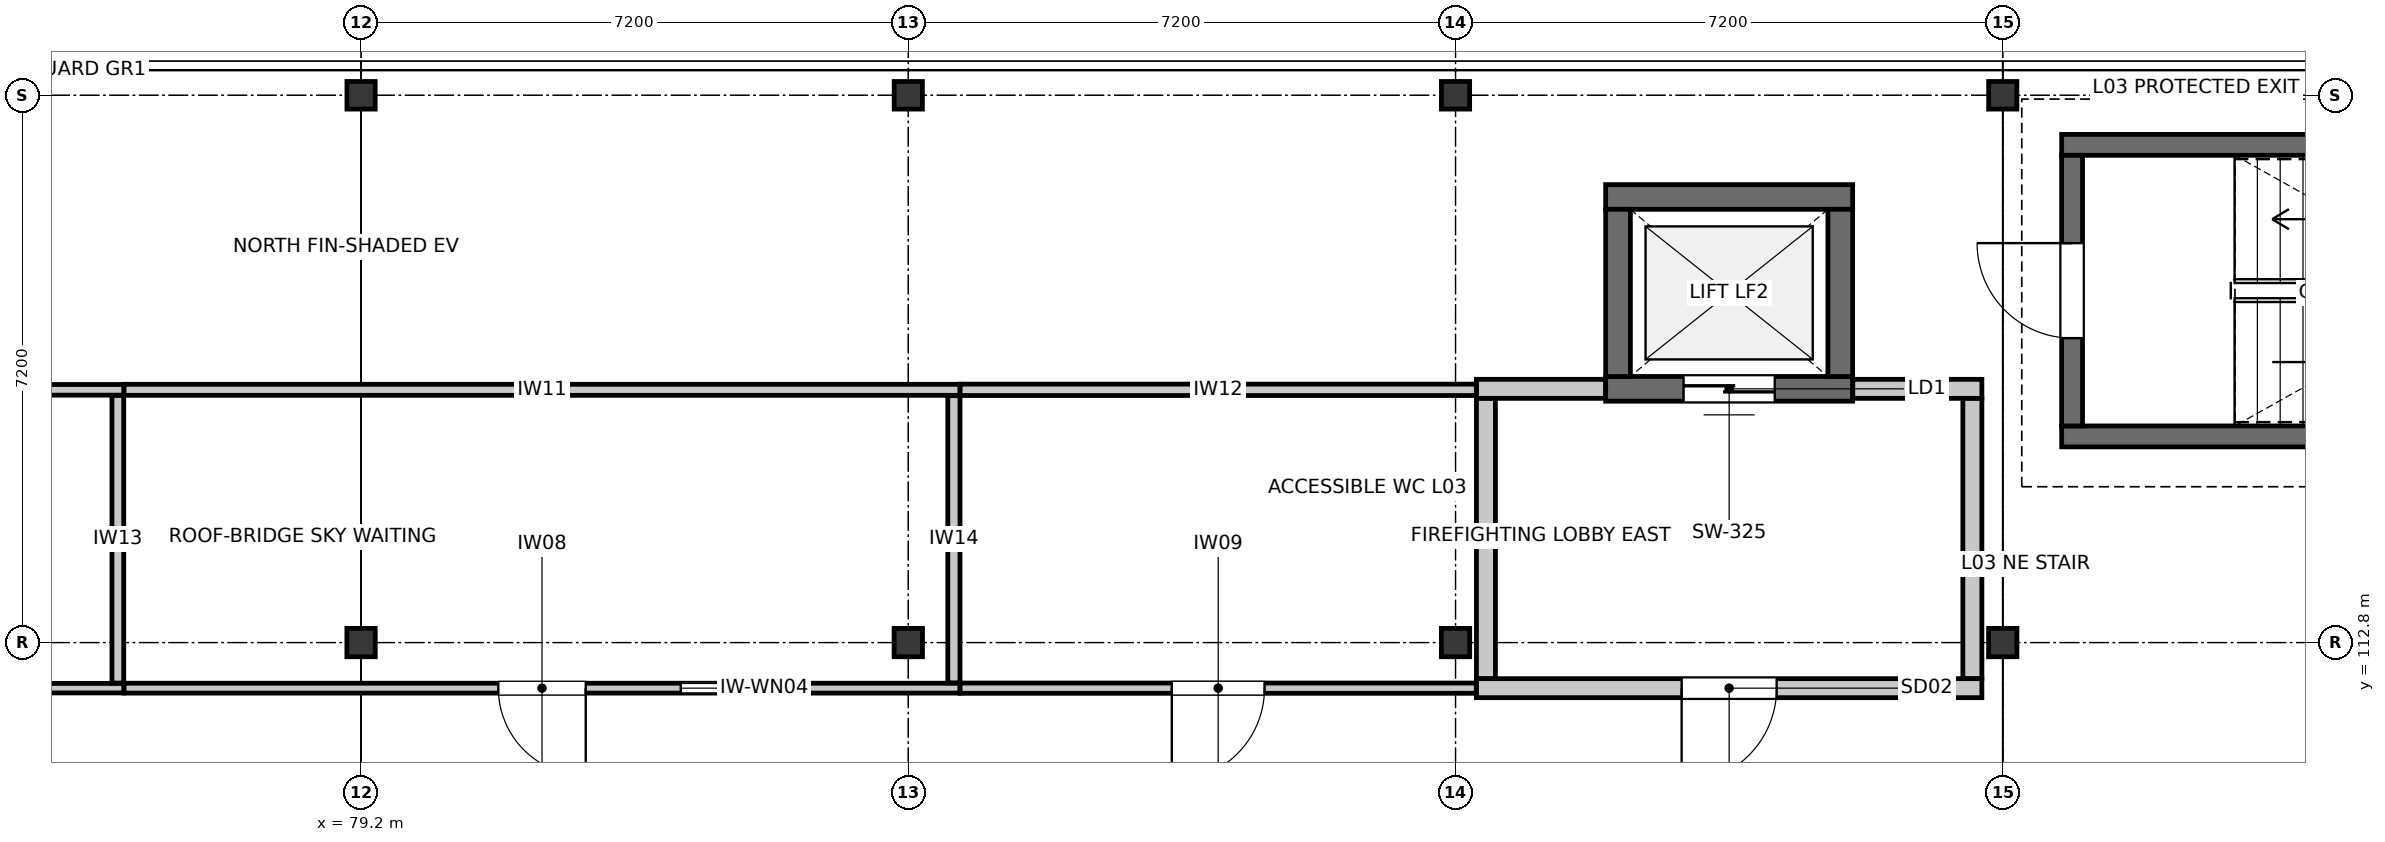
"""IFC4 building model, lengths in metres.
Left out: names, types, materials, properties, quantities, classifications, styles, units other than length and angle.
Written with IfcOpenShell. Run it as: python <this file> out.ifc"""

import sys

from ifc_helpers import new_model, si_unit, direction, frame, frame_2d, origin, origin_2d, place, context, subcontext, project, spatial, rectangle, i_section, extrude, element, fill, save


model = new_model("IFC4")
c1 = context("Model", 3, precision=1e-05, world=origin(), true_north=direction((0.0, 1.0)))
c2 = subcontext(c1, "Body", "Model", "MODEL_VIEW")
j1 = project(units=[si_unit("LENGTHUNIT", "METRE"), si_unit("PLANEANGLEUNIT", "RADIAN")], contexts=[c1])
p1 = place(None, origin())
s1 = spatial("IfcSite", under=j1, at=p1, CompositionType="ELEMENT")
p2 = place(p1, origin())
s2 = spatial("IfcBuilding", under=s1, at=p2, CompositionType="ELEMENT")
p3 = place(p2, frame((0.0, 0.0, 13.2)))
s3 = spatial("IfcBuildingStorey", under=s2, at=p3, CompositionType="ELEMENT", Elevation=13.2)
p4 = place(p3, frame((79.2, 112.8, 0.0), z_axis=(0.0, 0.0, 1.0), x_axis=(1.0, 0.0, 0.0)))
e1 = element("IfcColumn", 1, at=p4, inside=s3, PredefinedType="COLUMN", context=c2, shape_type="SweptSolid", body=[
    extrude(i_section(OverallWidth=0.373, OverallDepth=0.373, WebThickness=0.016, FlangeThickness=0.026, FilletRadius=0.015, at=origin_2d()), origin(), (0.0, 0.0, 1.0), 3.9),
])
p5 = place(p3, frame((79.2, 120.0, 0.0), z_axis=(0.0, 0.0, 1.0), x_axis=(1.0, 0.0, 0.0)))
e2 = element("IfcColumn", 2, at=p5, inside=s3, PredefinedType="COLUMN", context=c2, shape_type="SweptSolid", body=[
    extrude(i_section(OverallWidth=0.371, OverallDepth=0.363, WebThickness=0.013, FlangeThickness=0.022, FilletRadius=0.015, at=origin_2d()), origin(), (0.0, 0.0, 1.0), 3.9),
])
p6 = place(p3, frame((86.4, 112.8, 0.0), z_axis=(0.0, 0.0, 1.0), x_axis=(1.0, 0.0, 0.0)))
e3 = element("IfcColumn", 3, at=p6, inside=s3, PredefinedType="COLUMN", context=c2, shape_type="SweptSolid", body=[
    extrude(i_section(OverallWidth=0.373, OverallDepth=0.373, WebThickness=0.016, FlangeThickness=0.026, FilletRadius=0.015, at=origin_2d()), origin(), (0.0, 0.0, 1.0), 3.9),
])
p7 = place(p3, frame((86.4, 120.0, 0.0), z_axis=(0.0, 0.0, 1.0), x_axis=(1.0, 0.0, 0.0)))
e4 = element("IfcColumn", 4, at=p7, inside=s3, PredefinedType="COLUMN", context=c2, shape_type="SweptSolid", body=[
    extrude(i_section(OverallWidth=0.371, OverallDepth=0.363, WebThickness=0.013, FlangeThickness=0.022, FilletRadius=0.015, at=origin_2d()), origin(), (0.0, 0.0, 1.0), 3.9),
])
p8 = place(p3, frame((93.6, 112.8, 0.0), z_axis=(0.0, 0.0, 1.0), x_axis=(1.0, 0.0, 0.0)))
e5 = element("IfcColumn", 5, at=p8, inside=s3, PredefinedType="COLUMN", context=c2, shape_type="SweptSolid", body=[
    extrude(i_section(OverallWidth=0.373, OverallDepth=0.373, WebThickness=0.016, FlangeThickness=0.026, FilletRadius=0.015, at=origin_2d()), origin(), (0.0, 0.0, 1.0), 3.9),
])
p9 = place(p3, frame((93.6, 120.0, 0.0), z_axis=(0.0, 0.0, 1.0), x_axis=(1.0, 0.0, 0.0)))
e6 = element("IfcColumn", 6, at=p9, inside=s3, PredefinedType="COLUMN", context=c2, shape_type="SweptSolid", body=[
    extrude(i_section(OverallWidth=0.371, OverallDepth=0.363, WebThickness=0.013, FlangeThickness=0.022, FilletRadius=0.015, at=origin_2d()), origin(), (0.0, 0.0, 1.0), 3.9),
])
p10 = place(p3, frame((100.8, 112.8, 0.0), z_axis=(0.0, 0.0, 1.0), x_axis=(1.0, 0.0, 0.0)))
e7 = element("IfcColumn", 7, at=p10, inside=s3, PredefinedType="COLUMN", context=c2, shape_type="SweptSolid", body=[
    extrude(i_section(OverallWidth=0.373, OverallDepth=0.373, WebThickness=0.016, FlangeThickness=0.026, FilletRadius=0.015, at=origin_2d()), origin(), (0.0, 0.0, 1.0), 3.9),
])
p11 = place(p3, frame((100.8, 120.0, 0.0), z_axis=(0.0, 0.0, 1.0), x_axis=(1.0, 0.0, 0.0)))
e8 = element("IfcColumn", 8, at=p11, inside=s3, PredefinedType="COLUMN", context=c2, shape_type="SweptSolid", body=[
    extrude(i_section(OverallWidth=0.371, OverallDepth=0.363, WebThickness=0.013, FlangeThickness=0.022, FilletRadius=0.015, at=origin_2d()), origin(), (0.0, 0.0, 1.0), 3.9),
])
for number, where, z_axis, x_axis in (
    (9, (110.475, 115.512, 0.0), (0.0, 0.0, 1.0), (-1.0, 0.0, 0.0)),
    (10, (101.575, 119.348, 0.0), (0.0, 0.0, 1.0), (1.0, 0.0, 0.0)),
):
    element("IfcWall", number, at=place(p3, frame(where, z_axis=z_axis, x_axis=x_axis)), inside=s3, PredefinedType="SOLIDWALL", context=c2, shape_type="SweptSolid", body=[
        extrude(rectangle(XDim=8.9, YDim=0.275, at=frame_2d((4.45, 0.0))), origin(), (0.0, 0.0, 1.0), 3.66),
    ])
p12 = place(p3, frame((101.712, 115.65, 0.0), z_axis=(0.0, 0.0, 1.0), x_axis=(0.0, 1.0, 0.0)))
e11 = element("IfcWall", 11, at=p12, inside=s3, PredefinedType="SOLIDWALL", context=c2, shape_type="SweptSolid", body=[
    extrude(rectangle(XDim=3.56, YDim=0.275, at=frame_2d((1.78, 0.0))), origin(), (0.0, 0.0, 1.0), 3.66),
])
p13 = place(p12, frame((1.155, 0.0, 0.0)))
e12 = element("IfcOpeningElement", 12, at=p13, cuts=e11, PredefinedType="OPENING", context=c2, shape_type="SweptSolid", body=[
    extrude(rectangle(XDim=1.25, YDim=2.2, at=frame_2d((0.625, 1.1))), frame((0.0, 0.147, 0.0), z_axis=(0.0, -1.0, 0.0), x_axis=(1.0, 0.0, 0.0)), (0.0, 0.0, 1.0), 0.295),
])
p14 = place(p3, frame((98.825, 116.138, 0.0), z_axis=(0.0, 0.0, 1.0), x_axis=(-1.0, 0.0, 0.0)))
e13 = element("IfcWall", 13, at=p14, inside=s3, PredefinedType="SHEAR", context=c2, shape_type="SweptSolid", body=[
    extrude(rectangle(XDim=3.25, YDim=0.325, at=frame_2d((1.625, 0.0))), origin(), (0.0, 0.0, 1.0), 3.66),
])
p15 = place(p14, frame((1.025, 0.0, 0.0)))
e14 = element("IfcOpeningElement", 14, at=p15, cuts=e13, PredefinedType="OPENING", context=c2, shape_type="SweptSolid", body=[
    extrude(rectangle(XDim=1.2, YDim=2.2, at=frame_2d((0.6, 1.1))), frame((0.0, 0.172, 0.0), z_axis=(0.0, -1.0, 0.0), x_axis=(1.0, 0.0, 0.0)), (0.0, 0.0, 1.0), 0.345),
])
p16 = place(p3, frame((95.575, 118.662, 0.0), z_axis=(0.0, 0.0, 1.0), x_axis=(1.0, 0.0, 0.0)))
e15 = element("IfcWall", 15, at=p16, inside=s3, PredefinedType="SHEAR", context=c2, shape_type="SweptSolid", body=[
    extrude(rectangle(XDim=3.25, YDim=0.325, at=frame_2d((1.625, 0.0))), origin(), (0.0, 0.0, 1.0), 3.66),
])
for number, where, z_axis, x_axis in (
    (16, (95.738, 116.3, 0.0), (0.0, 0.0, 1.0), (0.0, 1.0, 0.0)),
    (17, (98.662, 118.5, 0.0), (0.0, 0.0, 1.0), (0.0, -1.0, 0.0)),
):
    element("IfcWall", number, at=place(p3, frame(where, z_axis=z_axis, x_axis=x_axis)), inside=s3, PredefinedType="SHEAR", context=c2, shape_type="SweptSolid", body=[
        extrude(rectangle(XDim=2.2, YDim=0.325, at=frame_2d((1.1, 0.0))), origin(), (0.0, 0.0, 1.0), 3.66),
    ])
p17 = place(p3, frame((100.525, 112.2, 0.0), z_axis=(0.0, 0.0, 1.0), x_axis=(-1.0, 0.0, 0.0)))
e18 = element("IfcWall", 18, at=p17, inside=s3, PredefinedType="PARTITIONING", context=c2, shape_type="SweptSolid", body=[
    extrude(rectangle(XDim=6.65, YDim=0.25, at=frame_2d((3.325, 0.0))), origin(), (0.0, 0.0, 1.0), 3.028),
])
p18 = place(p17, frame((2.7, 0.0, 0.0)))
e19 = element("IfcOpeningElement", 19, at=p18, cuts=e18, PredefinedType="OPENING", context=c2, shape_type="SweptSolid", body=[
    extrude(rectangle(XDim=1.25, YDim=2.2, at=frame_2d((0.625, 1.1))), frame((0.0, 0.135, 0.0), z_axis=(0.0, -1.0, 0.0), x_axis=(1.0, 0.0, 0.0)), (0.0, 0.0, 1.0), 0.27),
])
for number, where, z_axis, x_axis in (
    (20, (93.875, 116.138, 0.0), (0.0, 0.0, 1.0), (1.0, 0.0, 0.0)),
    (21, (98.827, 116.138, 0.0), (0.0, 0.0, 1.0), (1.0, 0.0, 0.0)),
):
    element("IfcWall", number, at=place(p3, frame(where, z_axis=z_axis, x_axis=x_axis)), inside=s3, PredefinedType="PARTITIONING", context=c2, shape_type="SweptSolid", body=[
        extrude(rectangle(XDim=1.698, YDim=0.25, at=frame_2d((0.849, 0.0))), origin(), (0.0, 0.0, 1.0), 3.028),
    ])
for number, where, z_axis, x_axis in (
    (22, (94.0, 112.327, 0.0), (0.0, 0.0, 1.0), (0.0, 1.0, 0.0)),
    (23, (100.4, 116.011, 0.0), (0.0, 0.0, 1.0), (0.0, -1.0, 0.0)),
):
    element("IfcWall", number, at=place(p3, frame(where, z_axis=z_axis, x_axis=x_axis)), inside=s3, PredefinedType="PARTITIONING", context=c2, shape_type="SweptSolid", body=[
        extrude(rectangle(XDim=3.684, YDim=0.25, at=frame_2d((1.842, 0.0))), origin(), (0.0, 0.0, 1.0), 3.028),
    ])
p19 = place(p3, frame((76.08, 112.2, 0.0), z_axis=(0.0, 0.0, 1.0), x_axis=(-1.0, 0.0, 0.0)))
e24 = element("IfcWall", 24, at=p19, inside=s3, PredefinedType="PARTITIONING", context=c2, shape_type="SweptSolid", body=[
    extrude(rectangle(XDim=11.553, YDim=0.125, at=frame_2d((5.776, 0.0))), origin(), (0.0, 0.0, 1.0), 3.028),
])
p20 = place(p19, frame((5.226, 0.0, 0.0)))
e25 = element("IfcOpeningElement", 25, at=p20, cuts=e24, PredefinedType="OPENING", context=c2, shape_type="SweptSolid", body=[
    extrude(rectangle(XDim=1.1, YDim=2.1, at=frame_2d((0.55, 1.05))), frame((0.0, 0.073, 0.0), z_axis=(0.0, -1.0, 0.0), x_axis=(1.0, 0.0, 0.0)), (0.0, 0.0, 1.0), 0.145),
])
p21 = place(p3, frame((87.08, 112.2, 0.0), z_axis=(0.0, 0.0, 1.0), x_axis=(-1.0, 0.0, 0.0)))
e26 = element("IfcWall", 26, at=p21, inside=s3, PredefinedType="PARTITIONING", context=c2, shape_type="SweptSolid", body=[
    extrude(rectangle(XDim=10.998, YDim=0.13, at=frame_2d((5.499, 0.0))), origin(), (0.0, 0.0, 1.0), 3.028),
])
p22 = place(p21, frame((4.924, 0.0, 0.0)))
e27 = element("IfcOpeningElement", 27, at=p22, cuts=e26, PredefinedType="OPENING", context=c2, shape_type="SweptSolid", body=[
    extrude(rectangle(XDim=1.15, YDim=2.1, at=frame_2d((0.575, 1.05))), frame((0.0, 0.075, 0.0), z_axis=(0.0, -1.0, 0.0), x_axis=(1.0, 0.0, 0.0)), (0.0, 0.0, 1.0), 0.15),
])
p23 = place(p21, frame((2.074, 0.0, 0.95)))
e28 = element("IfcOpeningElement", 28, at=p23, cuts=e26, PredefinedType="OPENING", context=c2, shape_type="SweptSolid", body=[
    extrude(rectangle(XDim=1.6, YDim=1.0, at=frame_2d((0.8, 0.5))), frame((0.0, 0.075, 0.0), z_axis=(0.0, -1.0, 0.0), x_axis=(1.0, 0.0, 0.0)), (0.0, 0.0, 1.0), 0.15),
])
p24 = place(p3, frame((93.873, 112.2, 0.0), z_axis=(0.0, 0.0, 1.0), x_axis=(-1.0, 0.0, 0.0)))
e29 = element("IfcWall", 29, at=p24, inside=s3, PredefinedType="PARTITIONING", context=c2, shape_type="SweptSolid", body=[
    extrude(rectangle(XDim=6.791, YDim=0.135, at=frame_2d((3.396, 0.0))), origin(), (0.0, 0.0, 1.0), 3.028),
])
p25 = place(p24, frame((2.786, 0.0, 0.0)))
e30 = element("IfcOpeningElement", 30, at=p25, cuts=e29, PredefinedType="OPENING", context=c2, shape_type="SweptSolid", body=[
    extrude(rectangle(XDim=1.22, YDim=2.1, at=frame_2d((0.61, 1.05))), frame((0.0, 0.077, 0.0), z_axis=(0.0, -1.0, 0.0), x_axis=(1.0, 0.0, 0.0)), (0.0, 0.0, 1.0), 0.155),
])
p26 = place(p3, frame((64.527, 116.125, 0.0), z_axis=(0.0, 0.0, 1.0), x_axis=(1.0, 0.0, 0.0)))
e31 = element("IfcWall", 31, at=p26, inside=s3, PredefinedType="PARTITIONING", context=c2, shape_type="SweptSolid", body=[
    extrude(rectangle(XDim=11.553, YDim=0.14, at=frame_2d((5.776, 0.0))), origin(), (0.0, 0.0, 1.0), 3.028),
])
p27 = place(p3, frame((76.082, 116.125, 0.0), z_axis=(0.0, 0.0, 1.0), x_axis=(1.0, 0.0, 0.0)))
e32 = element("IfcWall", 32, at=p27, inside=s3, PredefinedType="PARTITIONING", context=c2, shape_type="SweptSolid", body=[
    extrude(rectangle(XDim=10.998, YDim=0.145, at=frame_2d((5.499, 0.0))), origin(), (0.0, 0.0, 1.0), 3.028),
])
p28 = place(p3, frame((87.082, 116.125, 0.0), z_axis=(0.0, 0.0, 1.0), x_axis=(1.0, 0.0, 0.0)))
e33 = element("IfcWall", 33, at=p28, inside=s3, PredefinedType="PARTITIONING", context=c2, shape_type="SweptSolid", body=[
    extrude(rectangle(XDim=6.791, YDim=0.15, at=frame_2d((3.396, 0.0))), origin(), (0.0, 0.0, 1.0), 3.028),
])
p29 = place(p3, frame((76.0, 116.05, 0.0), z_axis=(0.0, 0.0, 1.0), x_axis=(0.0, -1.0, 0.0)))
e34 = element("IfcWall", 34, at=p29, inside=s3, PredefinedType="PARTITIONING", context=c2, shape_type="SweptSolid", body=[
    extrude(rectangle(XDim=3.783, YDim=0.155, at=frame_2d((1.892, 0.0))), origin(), (0.0, 0.0, 1.0), 3.028),
])
p30 = place(p3, frame((87.0, 116.048, 0.0), z_axis=(0.0, 0.0, 1.0), x_axis=(0.0, -1.0, 0.0)))
e35 = element("IfcWall", 35, at=p30, inside=s3, PredefinedType="PARTITIONING", context=c2, shape_type="SweptSolid", body=[
    extrude(rectangle(XDim=3.778, YDim=0.16, at=frame_2d((1.889, 0.0))), origin(), (0.0, 0.0, 1.0), 3.028),
])
p31 = place(p13, origin())
e36 = element("IfcDoor", 36, at=p31, inside=s3, OperationType="SINGLE_SWING_RIGHT", PredefinedType="DOOR", context=c2, shape_type="SweptSolid", body=[
    extrude(rectangle(XDim=1.25, YDim=2.2, at=frame_2d((0.625, 1.1))), frame((0.0, 0.025, 0.0), z_axis=(0.0, -1.0, 0.0), x_axis=(1.0, 0.0, 0.0)), (0.0, 0.0, 1.0), 0.05),
])
fill(e12, e36)
p32 = place(p15, origin())
e37 = element("IfcDoor", 37, at=p32, inside=s3, OperationType="DOUBLE_DOOR_SLIDING", PredefinedType="DOOR", context=c2, shape_type="SweptSolid", body=[
    extrude(rectangle(XDim=1.2, YDim=2.2, at=frame_2d((0.6, 1.1))), frame((0.0, 0.025, 0.0), z_axis=(0.0, -1.0, 0.0), x_axis=(1.0, 0.0, 0.0)), (0.0, 0.0, 1.0), 0.05),
])
fill(e14, e37)
p33 = place(p18, origin())
e38 = element("IfcDoor", 38, at=p33, inside=s3, OperationType="SINGLE_SWING_RIGHT", PredefinedType="DOOR", context=c2, shape_type="SweptSolid", body=[
    extrude(rectangle(XDim=1.25, YDim=2.2, at=frame_2d((0.625, 1.1))), frame((0.0, 0.025, 0.0), z_axis=(0.0, -1.0, 0.0), x_axis=(1.0, 0.0, 0.0)), (0.0, 0.0, 1.0), 0.05),
])
fill(e19, e38)
p34 = place(p22, origin())
e39 = element("IfcDoor", 39, at=p34, inside=s3, OperationType="SINGLE_SWING_LEFT", PredefinedType="DOOR", context=c2, shape_type="SweptSolid", body=[
    extrude(rectangle(XDim=1.15, YDim=2.1, at=frame_2d((0.575, 1.05))), frame((0.0, 0.025, 0.0), z_axis=(0.0, -1.0, 0.0), x_axis=(1.0, 0.0, 0.0)), (0.0, 0.0, 1.0), 0.05),
])
fill(e27, e39)
p35 = place(p23, origin())
e40 = element("IfcWindow", 40, at=p35, inside=s3, PartitioningType="SINGLE_PANEL", PredefinedType="WINDOW", context=c2, shape_type="SweptSolid", body=[
    extrude(rectangle(XDim=1.6, YDim=1.0, at=frame_2d((0.8, 0.5))), frame((0.0, 0.03, 0.0), z_axis=(0.0, -1.0, 0.0), x_axis=(1.0, 0.0, 0.0)), (0.0, 0.0, 1.0), 0.06),
])
fill(e28, e40)
p36 = place(p25, origin())
e41 = element("IfcDoor", 41, at=p36, inside=s3, OperationType="SINGLE_SWING_RIGHT", PredefinedType="DOOR", context=c2, shape_type="SweptSolid", body=[
    extrude(rectangle(XDim=1.22, YDim=2.1, at=frame_2d((0.61, 1.05))), frame((0.0, 0.025, 0.0), z_axis=(0.0, -1.0, 0.0), x_axis=(1.0, 0.0, 0.0)), (0.0, 0.0, 1.0), 0.05),
])
fill(e30, e41)
save(model, sys.argv[1])
